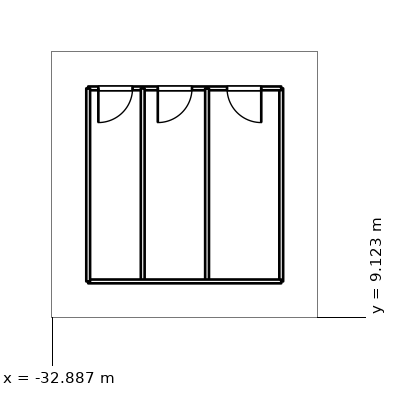
"""IFC4 building model, lengths in metres.
Left out: names, types, materials, properties, quantities, classifications, styles, units other than length and angle.
Written with IfcOpenShell. Run it as: python <this file> out.ifc"""

import sys

from ifc_helpers import new_model, si_unit, direction, frame, frame_2d, origin, place, context, subcontext, project, spatial, rectangle, extrude, element, fill, save


model = new_model("IFC4")
c1 = context("Model", 3, precision=1e-05, world=origin(), true_north=direction((0.0, 1.0)))
c2 = subcontext(c1, "Body", "Model", "MODEL_VIEW")
j1 = project(units=[si_unit("LENGTHUNIT", "METRE"), si_unit("PLANEANGLEUNIT", "RADIAN")], contexts=[c1])
p1 = place(None, origin())
s1 = spatial("IfcSite", under=j1, at=p1, CompositionType="ELEMENT")
p2 = place(p1, origin())
s2 = spatial("IfcBuilding", under=s1, at=p2, CompositionType="ELEMENT")
p3 = place(p2, frame((0.0, 0.0, 6.0)))
s3 = spatial("IfcBuildingStorey", under=s2, at=p3, CompositionType="ELEMENT", Elevation=6.0)
for number, where, z_axis, x_axis in (
    (1, (-31.94, 10.06, 0.0), (0.0, 0.0, 1.0), (1.0, 0.0, 0.0)),
    (2, (-26.86, 10.06, 0.0), (0.0, 0.0, 1.0), (0.0, 1.0, 0.0)),
):
    element("IfcWall", number, at=place(p3, frame(where, z_axis=z_axis, x_axis=x_axis)), inside=s3, PredefinedType="PARTITIONING", context=c2, shape_type="SweptSolid", body=[
        extrude(rectangle(XDim=5.08, YDim=0.1, at=frame_2d((2.54, 0.0))), origin(), (0.0, 0.0, 1.0), 4.7),
    ])
p4 = place(p3, frame((-26.86, 15.14, 0.0), z_axis=(0.0, 0.0, 1.0), x_axis=(-1.0, 0.0, 0.0)))
e3 = element("IfcWall", 3, at=p4, inside=s3, PredefinedType="PARTITIONING", context=c2, shape_type="SweptSolid", body=[
    extrude(rectangle(XDim=5.08, YDim=0.1, at=frame_2d((2.54, 0.0))), origin(), (0.0, 0.0, 1.0), 4.7),
])
p5 = place(p4, frame((3.913, 0.0, 0.0)))
e4 = element("IfcOpeningElement", 4, at=p5, cuts=e3, PredefinedType="OPENING", context=c2, shape_type="SweptSolid", body=[
    extrude(rectangle(XDim=0.9, YDim=2.1, at=frame_2d((0.45, 1.05))), frame((0.0, 0.06, 0.0), z_axis=(0.0, -1.0, 0.0), x_axis=(1.0, 0.0, 0.0)), (0.0, 0.0, 1.0), 0.12),
])
p6 = place(p4, frame((2.348, 0.0, 0.0)))
e5 = element("IfcOpeningElement", 5, at=p6, cuts=e3, PredefinedType="OPENING", context=c2, shape_type="SweptSolid", body=[
    extrude(rectangle(XDim=0.9, YDim=2.1, at=frame_2d((0.45, 1.05))), frame((0.0, 0.06, 0.0), z_axis=(0.0, -1.0, 0.0), x_axis=(1.0, 0.0, 0.0)), (0.0, 0.0, 1.0), 0.12),
])
p7 = place(p4, frame((0.526, 0.0, 0.0)))
e6 = element("IfcOpeningElement", 6, at=p7, cuts=e3, PredefinedType="OPENING", context=c2, shape_type="SweptSolid", body=[
    extrude(rectangle(XDim=0.9, YDim=2.1, at=frame_2d((0.45, 1.05))), frame((0.0, 0.06, 0.0), z_axis=(0.0, -1.0, 0.0), x_axis=(1.0, 0.0, 0.0)), (0.0, 0.0, 1.0), 0.12),
])
for number, where, z_axis, x_axis in (
    (7, (-31.94, 15.14, 0.0), (0.0, 0.0, 1.0), (0.0, -1.0, 0.0)),
    (8, (-30.505, 10.06, 0.0), (0.0, 0.0, 1.0), (0.0, 1.0, 0.0)),
    (9, (-28.812, 10.06, 0.0), (0.0, 0.0, 1.0), (0.0, 1.0, 0.0)),
):
    element("IfcWall", number, at=place(p3, frame(where, z_axis=z_axis, x_axis=x_axis)), inside=s3, PredefinedType="PARTITIONING", context=c2, shape_type="SweptSolid", body=[
        extrude(rectangle(XDim=5.08, YDim=0.1, at=frame_2d((2.54, 0.0))), origin(), (0.0, 0.0, 1.0), 4.7),
    ])
p8 = place(p5, origin())
e10 = element("IfcDoor", 10, at=p8, inside=s3, OperationType="SINGLE_SWING_RIGHT", PredefinedType="DOOR", context=c2, shape_type="SweptSolid", body=[
    extrude(rectangle(XDim=0.9, YDim=2.1, at=frame_2d((0.45, 1.05))), frame((0.0, 0.025, 0.0), z_axis=(0.0, -1.0, 0.0), x_axis=(1.0, 0.0, 0.0)), (0.0, 0.0, 1.0), 0.05),
])
fill(e4, e10)
p9 = place(p6, origin())
e11 = element("IfcDoor", 11, at=p9, inside=s3, OperationType="SINGLE_SWING_RIGHT", PredefinedType="DOOR", context=c2, shape_type="SweptSolid", body=[
    extrude(rectangle(XDim=0.9, YDim=2.1, at=frame_2d((0.45, 1.05))), frame((0.0, 0.025, 0.0), z_axis=(0.0, -1.0, 0.0), x_axis=(1.0, 0.0, 0.0)), (0.0, 0.0, 1.0), 0.05),
])
fill(e5, e11)
p10 = place(p7, origin())
e12 = element("IfcDoor", 12, at=p10, inside=s3, OperationType="SINGLE_SWING_LEFT", PredefinedType="DOOR", context=c2, shape_type="SweptSolid", body=[
    extrude(rectangle(XDim=0.9, YDim=2.1, at=frame_2d((0.45, 1.05))), frame((0.0, 0.025, 0.0), z_axis=(0.0, -1.0, 0.0), x_axis=(1.0, 0.0, 0.0)), (0.0, 0.0, 1.0), 0.05),
])
fill(e6, e12)
save(model, sys.argv[1])
